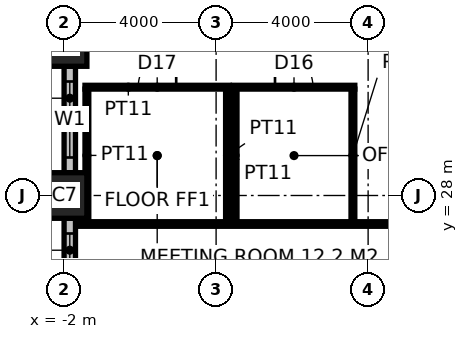
"""IFC4 building model, lengths in metres.
Left out: names, types, materials, properties, quantities, classifications, styles, units other than length and angle.
Written with IfcOpenShell. Run it as: python <this file> out.ifc"""

import sys

from ifc_helpers import new_model, si_unit, direction, frame, frame_2d, origin, origin_2d, place, context, subcontext, project, spatial, rectangle, hollow_rectangle, extrude, element, fill, save


model = new_model("IFC4")
c1 = context("Model", 3, precision=1e-05, world=origin(), true_north=direction((0.0, 1.0)))
c2 = subcontext(c1, "Body", "Model", "MODEL_VIEW")
j1 = project(units=[si_unit("LENGTHUNIT", "METRE"), si_unit("PLANEANGLEUNIT", "RADIAN")], contexts=[c1])
p1 = place(None, origin())
s1 = spatial("IfcSite", under=j1, at=p1, CompositionType="ELEMENT")
p2 = place(p1, origin())
s2 = spatial("IfcBuilding", under=s1, at=p2, CompositionType="ELEMENT")
p3 = place(p2, frame((0.0, 0.0, 19.0)))
s3 = spatial("IfcBuildingStorey", under=s2, at=p3, CompositionType="ELEMENT", Elevation=19.0)
for number, where, z_axis, x_axis in (
    (1, (-2.0, 28.0, 0.0), (0.0, 0.0, 1.0), (1.0, 0.0, 0.0)),
    (2, (-2.0, 32.0, 0.0), (0.0, 0.0, 1.0), (1.0, 0.0, 0.0)),
):
    element("IfcColumn", number, at=place(p3, frame(where, z_axis=z_axis, x_axis=x_axis)), inside=s3, PredefinedType="COLUMN", context=c2, shape_type="SweptSolid", body=[
        extrude(hollow_rectangle(XDim=1.2, YDim=1.2, WallThickness=0.1, at=origin_2d()), origin(), (0.0, 0.0, 1.0), 4.0),
    ])
p4 = place(p3, frame((-1.7, 27.25, 0.0), z_axis=(0.0, 0.0, 1.0), x_axis=(1.0, 0.0, 0.0)))
e3 = element("IfcWall", 3, at=p4, inside=s3, PredefinedType="PARTITIONING", context=c2, shape_type="SweptSolid", body=[
    extrude(rectangle(XDim=17.325, YDim=0.12, at=frame_2d((8.663, 0.0))), origin(), (0.0, 0.0, 1.0), 3.85),
])
p5 = place(p3, frame((-1.45, 30.85, 0.0), z_axis=(0.0, 0.0, 1.0), x_axis=(1.0, 0.0, 0.0)))
e4 = element("IfcWall", 4, at=p5, inside=s3, PredefinedType="PARTITIONING", context=c2, shape_type="SweptSolid", body=[
    extrude(rectangle(XDim=3.8, YDim=0.1, at=frame_2d((1.9, 0.0))), origin(), (0.0, 0.0, 1.0), 3.85),
])
p6 = place(p5, frame((1.4, 0.0, 0.0)))
e5 = element("IfcOpeningElement", 5, at=p6, cuts=e4, PredefinedType="OPENING", context=c2, shape_type="SweptSolid", body=[
    extrude(rectangle(XDim=1.0, YDim=2.2, at=frame_2d((0.5, 1.1))), frame((0.0, 0.06, 0.0), z_axis=(0.0, -1.0, 0.0), x_axis=(1.0, 0.0, 0.0)), (0.0, 0.0, 1.0), 0.12),
])
p7 = place(p3, frame((2.45, 30.85, 0.0), z_axis=(0.0, 0.0, 1.0), x_axis=(1.0, 0.0, 0.0)))
e6 = element("IfcWall", 6, at=p7, inside=s3, PredefinedType="PARTITIONING", context=c2, shape_type="SweptSolid", body=[
    extrude(rectangle(XDim=3.2, YDim=0.1, at=frame_2d((1.6, 0.0))), origin(), (0.0, 0.0, 1.0), 3.85),
])
p8 = place(p7, frame((1.1, 0.0, 0.0)))
e7 = element("IfcOpeningElement", 7, at=p8, cuts=e6, PredefinedType="OPENING", context=c2, shape_type="SweptSolid", body=[
    extrude(rectangle(XDim=1.0, YDim=2.2, at=frame_2d((0.5, 1.1))), frame((0.0, 0.06, 0.0), z_axis=(0.0, -1.0, 0.0), x_axis=(1.0, 0.0, 0.0)), (0.0, 0.0, 1.0), 0.12),
])
for number, where, z_axis, x_axis in (
    (8, (-1.4, 27.31, 0.0), (0.0, 0.0, 1.0), (0.0, 1.0, 0.0)),
    (9, (2.3, 27.31, 0.0), (0.0, 0.0, 1.0), (0.0, 1.0, 0.0)),
    (10, (2.5, 27.31, 0.0), (0.0, 0.0, 1.0), (0.0, 1.0, 0.0)),
    (11, (5.6, 27.31, 0.0), (0.0, 0.0, 1.0), (0.0, 1.0, 0.0)),
):
    element("IfcWall", number, at=place(p3, frame(where, z_axis=z_axis, x_axis=x_axis)), inside=s3, PredefinedType="PARTITIONING", context=c2, shape_type="SweptSolid", body=[
        extrude(rectangle(XDim=3.49, YDim=0.1, at=frame_2d((1.745, 0.0))), origin(), (0.0, 0.0, 1.0), 3.85),
    ])
p9 = place(p3, frame((-1.85, 27.4, 0.0), z_axis=(0.0, 0.0, 1.0), x_axis=(0.0, -1.0, 0.0)))
e12 = element("IfcWall", 12, at=p9, inside=s3, PredefinedType="ELEMENTEDWALL", context=c2, shape_type="SweptSolid", body=[
    extrude(rectangle(XDim=2.8, YDim=0.3, at=frame_2d((1.4, 0.0))), origin(), (0.0, 0.0, 1.0), 2.85),
])
p10 = place(p9, frame((0.4, 0.0, 0.8)))
e13 = element("IfcOpeningElement", 13, at=p10, cuts=e12, PredefinedType="OPENING", context=c2, shape_type="SweptSolid", body=[
    extrude(rectangle(XDim=2.0, YDim=2.0, at=frame_2d((1.0, 1.0))), frame((0.0, 0.16, 0.0), z_axis=(0.0, -1.0, 0.0), x_axis=(1.0, 0.0, 0.0)), (0.0, 0.0, 1.0), 0.32),
])
p11 = place(p3, frame((-1.85, 31.4, 0.0), z_axis=(0.0, 0.0, 1.0), x_axis=(0.0, -1.0, 0.0)))
e14 = element("IfcWall", 14, at=p11, inside=s3, PredefinedType="ELEMENTEDWALL", context=c2, shape_type="SweptSolid", body=[
    extrude(rectangle(XDim=2.8, YDim=0.3, at=frame_2d((1.4, 0.0))), origin(), (0.0, 0.0, 1.0), 2.85),
])
p12 = place(p11, frame((0.4, 0.0, 0.8)))
e15 = element("IfcOpeningElement", 15, at=p12, cuts=e14, PredefinedType="OPENING", context=c2, shape_type="SweptSolid", body=[
    extrude(rectangle(XDim=2.0, YDim=2.0, at=frame_2d((1.0, 1.0))), frame((0.0, 0.16, 0.0), z_axis=(0.0, -1.0, 0.0), x_axis=(1.0, 0.0, 0.0)), (0.0, 0.0, 1.0), 0.32),
])
p13 = place(p6, origin())
e16 = element("IfcDoor", 16, at=p13, inside=s3, OperationType="SINGLE_SWING_RIGHT", PredefinedType="DOOR", context=c2, shape_type="SweptSolid", body=[
    extrude(rectangle(XDim=1.0, YDim=2.2, at=frame_2d((0.5, 1.1))), frame((0.0, 0.025, 0.0), z_axis=(0.0, -1.0, 0.0), x_axis=(1.0, 0.0, 0.0)), (0.0, 0.0, 1.0), 0.05),
])
fill(e5, e16)
p14 = place(p8, origin())
e17 = element("IfcDoor", 17, at=p14, inside=s3, OperationType="SINGLE_SWING_LEFT", PredefinedType="DOOR", context=c2, shape_type="SweptSolid", body=[
    extrude(rectangle(XDim=1.0, YDim=2.2, at=frame_2d((0.5, 1.1))), frame((0.0, 0.025, 0.0), z_axis=(0.0, -1.0, 0.0), x_axis=(1.0, 0.0, 0.0)), (0.0, 0.0, 1.0), 0.05),
])
fill(e7, e17)
p15 = place(p10, origin())
e18 = element("IfcWindow", 18, at=p15, inside=s3, PartitioningType="SINGLE_PANEL", PredefinedType="WINDOW", context=c2, shape_type="SweptSolid", body=[
    extrude(rectangle(XDim=2.0, YDim=2.0, at=frame_2d((1.0, 1.0))), frame((0.0, 0.03, 0.0), z_axis=(0.0, -1.0, 0.0), x_axis=(1.0, 0.0, 0.0)), (0.0, 0.0, 1.0), 0.06),
])
fill(e13, e18)
p16 = place(p12, origin())
e19 = element("IfcWindow", 19, at=p16, inside=s3, PartitioningType="SINGLE_PANEL", PredefinedType="WINDOW", context=c2, shape_type="SweptSolid", body=[
    extrude(rectangle(XDim=2.0, YDim=2.0, at=frame_2d((1.0, 1.0))), frame((0.0, 0.03, 0.0), z_axis=(0.0, -1.0, 0.0), x_axis=(1.0, 0.0, 0.0)), (0.0, 0.0, 1.0), 0.06),
])
fill(e15, e19)
save(model, sys.argv[1])
